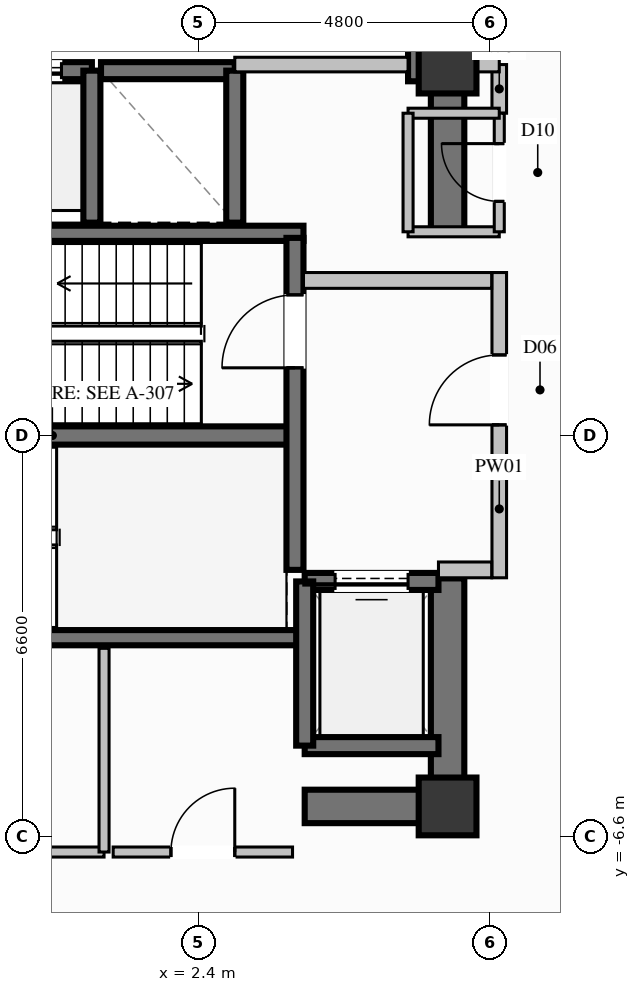
"""IFC4 building model, lengths in metres.
Left out: names, types, materials, properties, quantities, classifications, styles, units other than length and angle.
Written with IfcOpenShell. Run it as: python <this file> out.ifc"""

import sys

from ifc_helpers import new_model, si_unit, direction, frame, frame_2d, origin, origin_2d, place, context, subcontext, project, spatial, rectangle, extrude, element, fill, save


model = new_model("IFC4")
c1 = context("Model", 3, precision=1e-05, world=origin(), true_north=direction((0.0, 1.0)))
c2 = subcontext(c1, "Body", "Model", "MODEL_VIEW")
j1 = project(units=[si_unit("LENGTHUNIT", "METRE"), si_unit("PLANEANGLEUNIT", "RADIAN")], contexts=[c1])
p1 = place(None, origin())
s1 = spatial("IfcSite", under=j1, at=p1, CompositionType="ELEMENT")
p2 = place(p1, origin())
s2 = spatial("IfcBuilding", under=s1, at=p2, CompositionType="ELEMENT")
p3 = place(p2, frame((0.0, 0.0, 184.0)))
s3 = spatial("IfcBuildingStorey", under=s2, at=p3, CompositionType="ELEMENT", Elevation=184.0)
for number, where, z_axis, x_axis in (
    (1, (6.5, -6.1, 0.0), (0.0, 0.0, 1.0), (1.0, 0.0, 0.0)),
    (2, (6.5, 6.1, 0.0), (0.0, 0.0, 1.0), (1.0, 0.0, 0.0)),
):
    element("IfcColumn", number, at=place(p3, frame(where, z_axis=z_axis, x_axis=x_axis)), inside=s3, PredefinedType="COLUMN", context=c2, shape_type="SweptSolid", body=[
        extrude(rectangle(XDim=0.95, YDim=0.95, at=origin_2d()), origin(), (0.0, 0.0, 1.0), 3.6),
    ])
p4 = place(p3, frame((-3.99, 0.0, 0.0), z_axis=(0.0, 0.0, 1.0), x_axis=(1.0, 0.0, 0.0)))
e3 = element("IfcWall", 3, at=p4, inside=s3, PredefinedType="SHEAR", context=c2, shape_type="SweptSolid", body=[
    extrude(rectangle(XDim=7.98, YDim=0.3, at=frame_2d((3.99, 0.0))), origin(), (0.0, 0.0, 1.0), 3.6),
])
for number, where, z_axis, x_axis in (
    (4, (-4.13, -3.325, 0.0), (0.0, 0.0, 1.0), (1.0, 0.0, 0.0)),
    (5, (-4.13, 3.325, 0.0), (0.0, 0.0, 1.0), (1.0, 0.0, 0.0)),
):
    element("IfcWall", number, at=place(p3, frame(where, z_axis=z_axis, x_axis=x_axis)), inside=s3, PredefinedType="SOLIDWALL", context=c2, shape_type="SweptSolid", body=[
        extrude(rectangle(XDim=8.26, YDim=0.25, at=frame_2d((4.13, 0.0))), origin(), (0.0, 0.0, 1.0), 3.6),
    ])
p5 = place(p3, frame((4.15, -6.1, 0.0), z_axis=(0.0, 0.0, 1.0), x_axis=(1.0, 0.0, 0.0)))
e6 = element("IfcWall", 6, at=p5, inside=s3, PredefinedType="SHEAR", context=c2, shape_type="SweptSolid", body=[
    extrude(rectangle(XDim=2.075, YDim=0.55, at=frame_2d((1.038, 0.0))), origin(), (0.0, 0.0, 1.0), 3.6),
])
p6 = place(p3, frame((5.85, 6.1, 0.0), z_axis=(0.0, 0.0, 1.0), x_axis=(1.0, 0.0, 0.0)))
e7 = element("IfcWall", 7, at=p6, inside=s3, PredefinedType="SHEAR", context=c2, shape_type="SweptSolid", body=[
    extrude(rectangle(XDim=0.375, YDim=0.55, at=frame_2d((0.188, 0.0))), origin(), (0.0, 0.0, 1.0), 3.6),
])
p7 = place(p3, frame((6.5, -6.375, 0.0), z_axis=(0.0, 0.0, 1.0), x_axis=(0.0, 1.0, 0.0)))
e8 = element("IfcWall", 8, at=p7, inside=s3, PredefinedType="SHEAR", context=c2, shape_type="SweptSolid", body=[
    extrude(rectangle(XDim=4.025, YDim=0.55, at=frame_2d((2.012, 0.0))), origin(), (0.0, 0.0, 1.0), 3.6),
])
p8 = place(p3, frame((6.5, 3.35, 0.0), z_axis=(0.0, 0.0, 1.0), x_axis=(0.0, 1.0, 0.0)))
e9 = element("IfcWall", 9, at=p8, inside=s3, PredefinedType="SHEAR", context=c2, shape_type="SweptSolid", body=[
    extrude(rectangle(XDim=3.025, YDim=0.55, at=frame_2d((1.512, 0.0))), origin(), (0.0, 0.0, 1.0), 3.6),
])
p9 = place(p3, frame((0.65, 6.0, 0.0), z_axis=(0.0, 0.0, 1.0), x_axis=(-1.0, 0.0, 0.0)))
e10 = element("IfcWall", 10, at=p9, inside=s3, PredefinedType="SOLIDWALL", context=c2, shape_type="SweptSolid", body=[
    extrude(rectangle(XDim=2.1, YDim=0.28, at=frame_2d((1.05, 0.0))), origin(), (0.0, 0.0, 1.0), 3.36),
])
p10 = place(p9, frame((0.5, 0.0, 0.0)))
e11 = element("IfcOpeningElement", 11, at=p10, cuts=e10, PredefinedType="OPENING", context=c2, shape_type="SweptSolid", body=[
    extrude(rectangle(XDim=1.1, YDim=2.2, at=frame_2d((0.55, 1.1))), frame((0.0, 0.15, 0.0), z_axis=(0.0, -1.0, 0.0), x_axis=(1.0, 0.0, 0.0)), (0.0, 0.0, 1.0), 0.3),
])
p11 = place(p3, frame((0.65, 3.5, 0.0), z_axis=(0.0, 0.0, 1.0), x_axis=(0.0, 1.0, 0.0)))
e12 = element("IfcWall", 12, at=p11, inside=s3, PredefinedType="SOLIDWALL", context=c2, shape_type="SweptSolid", body=[
    extrude(rectangle(XDim=2.5, YDim=0.28, at=frame_2d((1.25, 0.0))), origin(), (0.0, 0.0, 1.0), 3.36),
])
p12 = place(p3, frame((3.0, 6.0, 0.0), z_axis=(0.0, 0.0, 1.0), x_axis=(-1.0, 0.0, 0.0)))
e13 = element("IfcWall", 13, at=p12, inside=s3, PredefinedType="SOLIDWALL", context=c2, shape_type="SweptSolid", body=[
    extrude(rectangle(XDim=2.2, YDim=0.28, at=frame_2d((1.1, 0.0))), origin(), (0.0, 0.0, 1.0), 3.36),
])
p13 = place(p3, frame((3.0, 3.5, 0.0), z_axis=(0.0, 0.0, 1.0), x_axis=(0.0, 1.0, 0.0)))
e14 = element("IfcWall", 14, at=p13, inside=s3, PredefinedType="SOLIDWALL", context=c2, shape_type="SweptSolid", body=[
    extrude(rectangle(XDim=2.5, YDim=0.28, at=frame_2d((1.25, 0.0))), origin(), (0.0, 0.0, 1.0), 3.36),
])
p14 = place(p3, frame((4.15, -5.1, 0.0), z_axis=(0.0, 0.0, 1.0), x_axis=(1.0, 0.0, 0.0)))
e15 = element("IfcWall", 15, at=p14, inside=s3, PredefinedType="SOLIDWALL", context=c2, shape_type="SweptSolid", body=[
    extrude(rectangle(XDim=2.2, YDim=0.28, at=frame_2d((1.1, 0.0))), origin(), (0.0, 0.0, 1.0), 3.36),
])
p15 = place(p3, frame((6.35, -2.4, 0.0), z_axis=(0.0, 0.0, 1.0), x_axis=(-1.0, 0.0, 0.0)))
e16 = element("IfcWall", 16, at=p15, inside=s3, PredefinedType="SOLIDWALL", context=c2, shape_type="SweptSolid", body=[
    extrude(rectangle(XDim=2.2, YDim=0.28, at=frame_2d((1.1, 0.0))), origin(), (0.0, 0.0, 1.0), 3.36),
])
p16 = place(p15, frame((0.5, 0.0, 0.0)))
e17 = element("IfcOpeningElement", 17, at=p16, cuts=e16, PredefinedType="OPENING", context=c2, shape_type="SweptSolid", body=[
    extrude(rectangle(XDim=1.2, YDim=2.2, at=frame_2d((0.6, 1.1))), frame((0.0, 0.15, 0.0), z_axis=(0.0, -1.0, 0.0), x_axis=(1.0, 0.0, 0.0)), (0.0, 0.0, 1.0), 0.3),
])
p17 = place(p3, frame((4.15, -2.4, 0.0), z_axis=(0.0, 0.0, 1.0), x_axis=(0.0, -1.0, 0.0)))
e18 = element("IfcWall", 18, at=p17, inside=s3, PredefinedType="SOLIDWALL", context=c2, shape_type="SweptSolid", body=[
    extrude(rectangle(XDim=2.7, YDim=0.28, at=frame_2d((1.35, 0.0))), origin(), (0.0, 0.0, 1.0), 3.36),
])
p18 = place(p3, frame((3.99, -2.21, 0.0), z_axis=(0.0, 0.0, 1.0), x_axis=(0.0, 1.0, 0.0)))
e19 = element("IfcWall", 19, at=p18, inside=s3, PredefinedType="SOLIDWALL", context=c2, shape_type="SweptSolid", body=[
    extrude(rectangle(XDim=5.46, YDim=0.28, at=frame_2d((2.73, 0.0))), origin(), (0.0, 0.0, 1.0), 3.36),
])
p19 = place(p18, frame((3.323, 0.0, 0.0)))
e20 = element("IfcOpeningElement", 20, at=p19, cuts=e19, PredefinedType="OPENING", context=c2, shape_type="SweptSolid", body=[
    extrude(rectangle(XDim=1.2, YDim=2.2, at=frame_2d((0.6, 1.1))), frame((0.0, 0.15, 0.0), z_axis=(0.0, -1.0, 0.0), x_axis=(1.0, 0.0, 0.0)), (0.0, 0.0, 1.0), 0.3),
])
p20 = place(p3, frame((7.35, -2.34, 0.0), z_axis=(0.0, 0.0, 1.0), x_axis=(0.0, 1.0, 0.0)))
e21 = element("IfcWall", 21, at=p20, inside=s3, PredefinedType="PARTITIONING", context=c2, shape_type="SweptSolid", body=[
    extrude(rectangle(XDim=5.02, YDim=0.24, at=frame_2d((2.51, 0.0))), origin(), (0.0, 0.0, 1.0), 2.445),
])
p21 = place(p20, frame((2.515, 0.0, 0.0)))
e22 = element("IfcOpeningElement", 22, at=p21, cuts=e21, PredefinedType="OPENING", context=c2, shape_type="SweptSolid", body=[
    extrude(rectangle(XDim=1.15, YDim=2.2, at=frame_2d((0.575, 1.1))), frame((0.0, 0.13, 0.0), z_axis=(0.0, -1.0, 0.0), x_axis=(1.0, 0.0, 0.0)), (0.0, 0.0, 1.0), 0.26),
])
p22 = place(p3, frame((6.35, -2.21, 0.0), z_axis=(0.0, 0.0, 1.0), x_axis=(1.0, 0.0, 0.0)))
e23 = element("IfcWall", 23, at=p22, inside=s3, PredefinedType="PARTITIONING", context=c2, shape_type="SweptSolid", body=[
    extrude(rectangle(XDim=0.875, YDim=0.26, at=frame_2d((0.438, 0.0))), origin(), (0.0, 0.0, 1.0), 3.36),
])
p23 = place(p3, frame((4.13, 2.55, 0.0), z_axis=(0.0, 0.0, 1.0), x_axis=(1.0, 0.0, 0.0)))
e24 = element("IfcWall", 24, at=p23, inside=s3, PredefinedType="PARTITIONING", context=c2, shape_type="SweptSolid", body=[
    extrude(rectangle(XDim=3.095, YDim=0.26, at=frame_2d((1.548, 0.0))), origin(), (0.0, 0.0, 1.0), 3.36),
])
p24 = place(p3, frame((3.0, 6.1, 0.0), z_axis=(0.0, 0.0, 1.0), x_axis=(1.0, 0.0, 0.0)))
e25 = element("IfcWall", 25, at=p24, inside=s3, PredefinedType="PARTITIONING", context=c2, shape_type="SweptSolid", body=[
    extrude(rectangle(XDim=2.85, YDim=0.24, at=frame_2d((1.425, 0.0))), origin(), (0.0, 0.0, 1.0), 2.445),
])
p25 = place(p3, frame((7.35, 5.3, 0.0), z_axis=(0.0, 0.0, 1.0), x_axis=(0.0, 1.0, 0.0)))
e26 = element("IfcWall", 26, at=p25, inside=s3, PredefinedType="PARTITIONING", context=c2, shape_type="SweptSolid", body=[
    extrude(rectangle(XDim=0.8, YDim=0.24, at=frame_2d((0.4, 0.0))), origin(), (0.0, 0.0, 1.0), 2.445),
])
p26 = place(p3, frame((6.5, 6.1, 0.0), z_axis=(0.0, 0.0, 1.0), x_axis=(1.0, 0.0, 0.0)))
e27 = element("IfcWall", 27, at=p26, inside=s3, PredefinedType="PARTITIONING", context=c2, shape_type="SweptSolid", body=[
    extrude(rectangle(XDim=0.85, YDim=0.24, at=frame_2d((0.425, 0.0))), origin(), (0.0, 0.0, 1.0), 2.877),
])
p27 = place(p3, frame((5.85, 3.35, 0.0), z_axis=(0.0, 0.0, 1.0), x_axis=(1.0, 0.0, 0.0)))
e28 = element("IfcWall", 28, at=p27, inside=s3, PredefinedType="PARTITIONING", context=c2, shape_type="SweptSolid", body=[
    extrude(rectangle(XDim=1.5, YDim=0.165, at=frame_2d((0.75, 0.0))), origin(), (0.0, 0.0, 1.0), 3.36),
])
p28 = place(p3, frame((7.35, 3.35, 0.0), z_axis=(0.0, 0.0, 1.0), x_axis=(0.0, 1.0, 0.0)))
e29 = element("IfcWall", 29, at=p28, inside=s3, PredefinedType="PARTITIONING", context=c2, shape_type="SweptSolid", body=[
    extrude(rectangle(XDim=1.95, YDim=0.165, at=frame_2d((0.975, 0.0))), origin(), (0.0, 0.0, 1.0), 3.36),
])
p29 = place(p28, frame((0.5, 0.0, 0.0)))
e30 = element("IfcOpeningElement", 30, at=p29, cuts=e29, PredefinedType="OPENING", context=c2, shape_type="SweptSolid", body=[
    extrude(rectangle(XDim=0.95, YDim=2.1, at=frame_2d((0.475, 1.05))), frame((0.0, 0.093, 0.0), z_axis=(0.0, -1.0, 0.0), x_axis=(1.0, 0.0, 0.0)), (0.0, 0.0, 1.0), 0.185),
])
p30 = place(p3, frame((7.35, 5.3, 0.0), z_axis=(0.0, 0.0, 1.0), x_axis=(-1.0, 0.0, 0.0)))
e31 = element("IfcWall", 31, at=p30, inside=s3, PredefinedType="PARTITIONING", context=c2, shape_type="SweptSolid", body=[
    extrude(rectangle(XDim=1.5, YDim=0.165, at=frame_2d((0.75, 0.0))), origin(), (0.0, 0.0, 1.0), 2.445),
])
p31 = place(p3, frame((5.85, 5.3, 0.0), z_axis=(0.0, 0.0, 1.0), x_axis=(0.0, -1.0, 0.0)))
e32 = element("IfcWall", 32, at=p31, inside=s3, PredefinedType="PARTITIONING", context=c2, shape_type="SweptSolid", body=[
    extrude(rectangle(XDim=1.95, YDim=0.165, at=frame_2d((0.975, 0.0))), origin(), (0.0, 0.0, 1.0), 2.445),
])
p32 = place(p3, frame((-5.7, -6.85, 0.0), z_axis=(0.0, 0.0, 1.0), x_axis=(1.0, 0.0, 0.0)))
e33 = element("IfcWall", 33, at=p32, inside=s3, PredefinedType="PARTITIONING", context=c2, shape_type="SweptSolid", body=[
    extrude(rectangle(XDim=6.55, YDim=0.165, at=frame_2d((3.275, 0.0))), origin(), (0.0, 0.0, 1.0), 2.445),
])
p33 = place(p32, frame((2.8, 0.0, 0.0)))
e34 = element("IfcOpeningElement", 34, at=p33, cuts=e33, PredefinedType="OPENING", context=c2, shape_type="SweptSolid", body=[
    extrude(rectangle(XDim=0.95, YDim=2.1, at=frame_2d((0.475, 1.05))), frame((0.0, 0.093, 0.0), z_axis=(0.0, -1.0, 0.0), x_axis=(1.0, 0.0, 0.0)), (0.0, 0.0, 1.0), 0.185),
])
p34 = place(p3, frame((0.85, -6.85, 0.0), z_axis=(0.0, 0.0, 1.0), x_axis=(0.0, 1.0, 0.0)))
e35 = element("IfcWall", 35, at=p34, inside=s3, PredefinedType="PARTITIONING", context=c2, shape_type="SweptSolid", body=[
    extrude(rectangle(XDim=3.35, YDim=0.165, at=frame_2d((1.675, 0.0))), origin(), (0.0, 0.0, 1.0), 3.36),
])
p35 = place(p3, frame((1.0, -6.85, 0.0), z_axis=(0.0, 0.0, 1.0), x_axis=(1.0, 0.0, 0.0)))
e36 = element("IfcWall", 36, at=p35, inside=s3, PredefinedType="PARTITIONING", context=c2, shape_type="SweptSolid", body=[
    extrude(rectangle(XDim=2.95, YDim=0.165, at=frame_2d((1.475, 0.0))), origin(), (0.0, 0.0, 1.0), 2.445),
])
p36 = place(p35, frame((0.95, 0.0, 0.0)))
e37 = element("IfcOpeningElement", 37, at=p36, cuts=e36, PredefinedType="OPENING", context=c2, shape_type="SweptSolid", body=[
    extrude(rectangle(XDim=1.05, YDim=2.15, at=frame_2d((0.525, 1.075))), frame((0.0, 0.093, 0.0), z_axis=(0.0, -1.0, 0.0), x_axis=(1.0, 0.0, 0.0)), (0.0, 0.0, 1.0), 0.185),
])
p37 = place(p10, origin())
e38 = element("IfcDoor", 38, at=p37, inside=s3, OperationType="SLIDING_TO_LEFT", PredefinedType="DOOR", context=c2, shape_type="SweptSolid", body=[
    extrude(rectangle(XDim=1.1, YDim=2.2, at=frame_2d((0.55, 1.1))), frame((0.0, 0.025, 0.0), z_axis=(0.0, -1.0, 0.0), x_axis=(1.0, 0.0, 0.0)), (0.0, 0.0, 1.0), 0.05),
])
fill(e11, e38)
p38 = place(p16, origin())
e39 = element("IfcDoor", 39, at=p38, inside=s3, OperationType="SLIDING_TO_LEFT", PredefinedType="DOOR", context=c2, shape_type="SweptSolid", body=[
    extrude(rectangle(XDim=1.2, YDim=2.2, at=frame_2d((0.6, 1.1))), frame((0.0, 0.025, 0.0), z_axis=(0.0, -1.0, 0.0), x_axis=(1.0, 0.0, 0.0)), (0.0, 0.0, 1.0), 0.05),
])
fill(e17, e39)
p39 = place(p19, origin())
e40 = element("IfcDoor", 40, at=p39, inside=s3, OperationType="SINGLE_SWING_LEFT", PredefinedType="DOOR", context=c2, shape_type="SweptSolid", body=[
    extrude(rectangle(XDim=1.2, YDim=2.2, at=frame_2d((0.6, 1.1))), frame((0.0, 0.025, 0.0), z_axis=(0.0, -1.0, 0.0), x_axis=(1.0, 0.0, 0.0)), (0.0, 0.0, 1.0), 0.05),
])
fill(e20, e40)
p40 = place(p21, origin())
e41 = element("IfcDoor", 41, at=p40, inside=s3, OperationType="SINGLE_SWING_LEFT", PredefinedType="DOOR", context=c2, shape_type="SweptSolid", body=[
    extrude(rectangle(XDim=1.15, YDim=2.2, at=frame_2d((0.575, 1.1))), frame((0.0, 0.025, 0.0), z_axis=(0.0, -1.0, 0.0), x_axis=(1.0, 0.0, 0.0)), (0.0, 0.0, 1.0), 0.05),
])
fill(e22, e41)
p41 = place(p29, origin())
e42 = element("IfcDoor", 42, at=p41, inside=s3, OperationType="SINGLE_SWING_RIGHT", PredefinedType="DOOR", context=c2, shape_type="SweptSolid", body=[
    extrude(rectangle(XDim=0.95, YDim=2.1, at=frame_2d((0.475, 1.05))), frame((0.0, 0.025, 0.0), z_axis=(0.0, -1.0, 0.0), x_axis=(1.0, 0.0, 0.0)), (0.0, 0.0, 1.0), 0.05),
])
fill(e30, e42)
p42 = place(p36, origin())
e43 = element("IfcDoor", 43, at=p42, inside=s3, OperationType="SINGLE_SWING_RIGHT", PredefinedType="DOOR", context=c2, shape_type="SweptSolid", body=[
    extrude(rectangle(XDim=1.05, YDim=2.15, at=frame_2d((0.525, 1.075))), frame((0.0, 0.025, 0.0), z_axis=(0.0, -1.0, 0.0), x_axis=(1.0, 0.0, 0.0)), (0.0, 0.0, 1.0), 0.05),
])
fill(e37, e43)
save(model, sys.argv[1])
